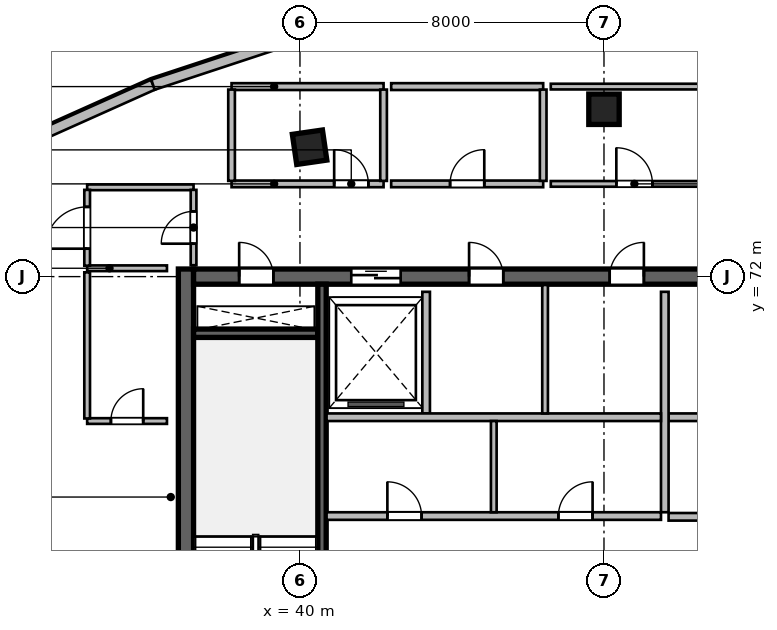
"""IFC4 building model, lengths in metres.
Left out: names, types, materials, properties, quantities, classifications, styles, units other than length and angle.
Written with IfcOpenShell. Run it as: python <this file> out.ifc"""

import sys

from ifc_helpers import new_model, si_unit, direction, frame, frame_2d, origin, origin_2d, place, context, subcontext, project, spatial, rectangle, extrude, source, transform, mapped, element, fill, save


model = new_model("IFC4")
c1 = context("Model", 3, precision=1e-05, world=origin(), true_north=direction((0.0, 1.0)))
c2 = subcontext(c1, "Body", "Model", "MODEL_VIEW")
j1 = project(units=[si_unit("LENGTHUNIT", "METRE"), si_unit("PLANEANGLEUNIT", "RADIAN")], contexts=[c1])
p1 = place(None, origin())
s1 = spatial("IfcSite", under=j1, at=p1, CompositionType="ELEMENT")
p2 = place(p1, origin())
s2 = spatial("IfcBuilding", under=s1, at=p2, CompositionType="ELEMENT")
p3 = place(p2, frame((0.0, 0.0, 267.9)))
s3 = spatial("IfcBuildingStorey", under=s2, at=p3, CompositionType="ELEMENT", Elevation=267.9)
m1 = source(origin(), c2, "Body", "SweptSolid", [
    extrude(rectangle(XDim=12.0, YDim=0.4, at=frame_2d((6.0, 0.0))), origin(), (0.0, 0.0, 1.0), 3.9),
])
p4 = place(p3, frame((37.0, 60.2, 0.0), z_axis=(0.0, 0.0, 1.0), x_axis=(0.0, 1.0, 0.0)))
e1 = element("IfcWall", 1, at=p4, inside=s3, PredefinedType="SHEAR", context=c2, shape_type="MappedRepresentation", body=[
    mapped(m1, transform((0.0, 0.0, 0.0), scale=1.0)),
])
m2 = source(origin(), c2, "Body", "SweptSolid", [
    extrude(rectangle(XDim=21.6, YDim=0.4, at=frame_2d((10.8, 0.0))), origin(), (0.0, 0.0, 1.0), 3.9),
])
p5 = place(p3, frame((37.2, 72.0, 0.0), z_axis=(0.0, 0.0, 1.0), x_axis=(1.0, 0.0, 0.0)))
e2 = element("IfcWall", 2, at=p5, inside=s3, PredefinedType="SHEAR", context=c2, shape_type="MappedRepresentation", body=[
    mapped(m2, transform((0.0, 0.0, 0.0), scale=1.0)),
])
p6 = place(p5, frame((1.2, 0.0, 0.0)))
e3 = element("IfcOpeningElement", 3, at=p6, cuts=e2, PredefinedType="OPENING", context=c2, shape_type="SweptSolid", body=[
    extrude(rectangle(XDim=0.9, YDim=2.1, at=frame_2d((0.45, 1.05))), frame((0.0, 0.21, 0.0), z_axis=(0.0, -1.0, 0.0), x_axis=(1.0, 0.0, 0.0)), (0.0, 0.0, 1.0), 0.42),
])
p7 = place(p5, frame((14.7, 0.0, 0.0)))
e4 = element("IfcOpeningElement", 4, at=p7, cuts=e2, PredefinedType="OPENING", context=c2, shape_type="SweptSolid", body=[
    extrude(rectangle(XDim=1.2, YDim=2.15, at=frame_2d((0.6, 1.075))), frame((0.0, 0.21, 0.0), z_axis=(0.0, -1.0, 0.0), x_axis=(1.0, 0.0, 0.0)), (0.0, 0.0, 1.0), 0.42),
])
p8 = place(p5, frame((4.15, 0.0, 0.0)))
e5 = element("IfcOpeningElement", 5, at=p8, cuts=e2, PredefinedType="OPENING", context=c2, shape_type="SweptSolid", body=[
    extrude(rectangle(XDim=1.3, YDim=2.15, at=frame_2d((0.65, 1.075))), frame((0.0, 0.21, 0.0), z_axis=(0.0, -1.0, 0.0), x_axis=(1.0, 0.0, 0.0)), (0.0, 0.0, 1.0), 0.42),
])
p9 = place(p5, frame((7.25, 0.0, 0.0)))
e6 = element("IfcOpeningElement", 6, at=p9, cuts=e2, PredefinedType="OPENING", context=c2, shape_type="SweptSolid", body=[
    extrude(rectangle(XDim=0.9, YDim=2.1, at=frame_2d((0.45, 1.05))), frame((0.0, 0.21, 0.0), z_axis=(0.0, -1.0, 0.0), x_axis=(1.0, 0.0, 0.0)), (0.0, 0.0, 1.0), 0.42),
])
p10 = place(p5, frame((10.95, 0.0, 0.0)))
e7 = element("IfcOpeningElement", 7, at=p10, cuts=e2, PredefinedType="OPENING", context=c2, shape_type="SweptSolid", body=[
    extrude(rectangle(XDim=0.9, YDim=2.1, at=frame_2d((0.45, 1.05))), frame((0.0, 0.21, 0.0), z_axis=(0.0, -1.0, 0.0), x_axis=(1.0, 0.0, 0.0)), (0.0, 0.0, 1.0), 0.42),
])
m3 = source(origin(), c2, "Body", "SweptSolid", [
    extrude(rectangle(XDim=3.27, YDim=0.22, at=frame_2d((1.635, 0.0))), origin(), (0.0, 0.0, 1.0), 3.9),
])
p11 = place(p3, frame((37.2, 70.51, 0.0), z_axis=(0.0, 0.0, 1.0), x_axis=(1.0, 0.0, 0.0)))
e8 = element("IfcWall", 8, at=p11, inside=s3, PredefinedType="SHEAR", context=c2, shape_type="MappedRepresentation", body=[
    mapped(m3, transform((0.0, 0.0, 0.0), scale=1.0)),
])
m4 = source(origin(), c2, "Body", "SweptSolid", [
    extrude(rectangle(XDim=11.2, YDim=0.22, at=frame_2d((5.6, 0.0))), origin(), (0.0, 0.0, 1.0), 3.9),
])
p12 = place(p3, frame((40.58, 60.6, 0.0), z_axis=(0.0, 0.0, 1.0), x_axis=(0.0, 1.0, 0.0)))
e9 = element("IfcWall", 9, at=p12, inside=s3, PredefinedType="SHEAR", context=c2, shape_type="MappedRepresentation", body=[
    mapped(m4, transform((0.0, 0.0, 0.0), scale=1.0)),
])
m5 = source(origin(), c2, "Body", "SweptSolid", [
    extrude(rectangle(XDim=0.8, YDim=0.8, at=origin_2d()), origin(), (0.0, 0.0, 1.0), 3.9),
])
for number, where, z_axis, x_axis in (
    (10, (40.253, 75.404, 0.0), (0.0, 0.0, 1.0), (-0.143, 0.99, 0.0)),
    (11, (48.0, 76.404, 0.0), (0.0, 0.0, 1.0), (0.0, 1.0, 0.0)),
):
    element("IfcColumn", number, at=place(p3, frame(where, z_axis=z_axis, x_axis=x_axis)), inside=s3, PredefinedType="COLUMN", context=c2, shape_type="MappedRepresentation", body=[
        mapped(m5, transform((0.0, 0.0, 0.0), scale=1.0)),
    ])
m6 = source(origin(), c2, "Body", "SweptSolid", [
    extrude(rectangle(XDim=3.599, YDim=0.28, at=frame_2d((1.799, 0.0))), origin(), (0.0, 0.0, 1.0), 3.65),
])
p13 = place(p3, frame((32.848, 75.579, 0.0), z_axis=(0.0, 0.0, 1.0), x_axis=(0.912714407797, 0.40859810303, 0.0)))
e12 = element("IfcWall", 12, at=p13, inside=s3, PredefinedType="SOLIDWALL", context=c2, shape_type="MappedRepresentation", body=[
    mapped(m6, transform((0.0, 0.0, 0.0), scale=1.0)),
])
m7 = source(origin(), c2, "Body", "SweptSolid", [
    extrude(rectangle(XDim=3.54, YDim=0.28, at=frame_2d((1.77, 0.0))), origin(), (0.0, 0.0, 1.0), 3.65),
])
p14 = place(p3, frame((36.132, 77.049, 0.0), z_axis=(0.0, 0.0, 1.0), x_axis=(0.949678507031, 0.313226329165, 0.0)))
e13 = element("IfcWall", 13, at=p14, inside=s3, PredefinedType="SOLIDWALL", context=c2, shape_type="MappedRepresentation", body=[
    mapped(m7, transform((0.0, 0.0, 0.0), scale=1.0)),
])
m8 = source(origin(), c2, "Body", "SweptSolid", [
    extrude(rectangle(XDim=5.62, YDim=0.2, at=frame_2d((2.81, 0.0))), origin(), (0.0, 0.0, 1.0), 3.65),
])
p15 = place(p3, frame((49.7, 68.3, 0.0), z_axis=(0.0, 0.0, 1.0), x_axis=(1.0, 0.0, 0.0)))
e14 = element("IfcWall", 14, at=p15, inside=s3, PredefinedType="SOLIDWALL", context=c2, shape_type="MappedRepresentation", body=[
    mapped(m8, transform((0.0, 0.0, 0.0), scale=1.0)),
])
p16 = place(p15, frame((1.6, 0.0, 0.0)))
e15 = element("IfcOpeningElement", 15, at=p16, cuts=e14, PredefinedType="OPENING", context=c2, shape_type="SweptSolid", body=[
    extrude(rectangle(XDim=1.1, YDim=2.15, at=frame_2d((0.55, 1.075))), frame((0.0, 0.11, 0.0), z_axis=(0.0, -1.0, 0.0), x_axis=(1.0, 0.0, 0.0)), (0.0, 0.0, 1.0), 0.22),
])
p17 = place(p15, frame((3.7, 0.0, 0.0)))
e16 = element("IfcOpeningElement", 16, at=p17, cuts=e14, PredefinedType="OPENING", context=c2, shape_type="SweptSolid", body=[
    extrude(rectangle(XDim=1.1, YDim=2.15, at=frame_2d((0.55, 1.075))), frame((0.0, 0.11, 0.0), z_axis=(0.0, -1.0, 0.0), x_axis=(1.0, 0.0, 0.0)), (0.0, 0.0, 1.0), 0.22),
])
m9 = source(origin(), c2, "Body", "SweptSolid", [
    extrude(rectangle(XDim=5.8, YDim=0.2, at=frame_2d((2.9, 0.0))), origin(), (0.0, 0.0, 1.0), 3.65),
])
p18 = place(p3, frame((49.6, 65.8, 0.0), z_axis=(0.0, 0.0, 1.0), x_axis=(0.0, 1.0, 0.0)))
e17 = element("IfcWall", 17, at=p18, inside=s3, PredefinedType="SOLIDWALL", context=c2, shape_type="MappedRepresentation", body=[
    mapped(m9, transform((0.0, 0.0, 0.0), scale=1.0)),
])
p19 = place(p3, frame((49.7, 65.68, 0.0), z_axis=(0.0, 0.0, 1.0), x_axis=(1.0, 0.0, 0.0)))
e18 = element("IfcWall", 18, at=p19, inside=s3, PredefinedType="SOLIDWALL", context=c2, shape_type="MappedRepresentation", body=[
    mapped(m8, transform((0.0, 0.0, 0.0), scale=1.0)),
])
m10 = source(origin(), c2, "Body", "SweptSolid", [
    extrude(rectangle(XDim=3.2, YDim=0.2, at=frame_2d((1.6, 0.0))), origin(), (0.0, 0.0, 1.0), 3.65),
])
p20 = place(p3, frame((43.32, 68.4, 0.0), z_axis=(0.0, 0.0, 1.0), x_axis=(0.0, 1.0, 0.0)))
e19 = element("IfcWall", 19, at=p20, inside=s3, PredefinedType="SOLIDWALL", context=c2, shape_type="MappedRepresentation", body=[
    mapped(m10, transform((0.0, 0.0, 0.0), scale=1.0)),
])
m11 = source(origin(), c2, "Body", "SweptSolid", [
    extrude(rectangle(XDim=8.8, YDim=0.2, at=frame_2d((4.4, 0.0))), origin(), (0.0, 0.0, 1.0), 3.65),
])
p21 = place(p3, frame((40.7, 68.3, 0.0), z_axis=(0.0, 0.0, 1.0), x_axis=(1.0, 0.0, 0.0)))
e20 = element("IfcWall", 20, at=p21, inside=s3, PredefinedType="SOLIDWALL", context=c2, shape_type="MappedRepresentation", body=[
    mapped(m11, transform((0.0, 0.0, 0.0), scale=1.0)),
])
m12 = source(origin(), c2, "Body", "SweptSolid", [
    extrude(rectangle(XDim=3.38, YDim=0.15, at=frame_2d((1.69, 0.0))), origin(), (0.0, 0.0, 1.0), 3.65),
])
p22 = place(p3, frame((46.45, 68.4, 0.0), z_axis=(0.0, 0.0, 1.0), x_axis=(0.0, 1.0, 0.0)))
e21 = element("IfcWall", 21, at=p22, inside=s3, PredefinedType="PARTITIONING", context=c2, shape_type="MappedRepresentation", body=[
    mapped(m12, transform((0.0, 0.0, 0.0), scale=1.0)),
])
p23 = place(p3, frame((40.7, 65.7, 0.0), z_axis=(0.0, 0.0, 1.0), x_axis=(1.0, 0.0, 0.0)))
e22 = element("IfcWall", 22, at=p23, inside=s3, PredefinedType="SOLIDWALL", context=c2, shape_type="MappedRepresentation", body=[
    mapped(m11, transform((0.0, 0.0, 0.0), scale=1.0)),
])
p24 = place(p23, frame((1.6, 0.0, 0.0)))
e23 = element("IfcOpeningElement", 23, at=p24, cuts=e22, PredefinedType="OPENING", context=c2, shape_type="SweptSolid", body=[
    extrude(rectangle(XDim=0.9, YDim=2.1, at=frame_2d((0.45, 1.05))), frame((0.0, 0.11, 0.0), z_axis=(0.0, -1.0, 0.0), x_axis=(1.0, 0.0, 0.0)), (0.0, 0.0, 1.0), 0.22),
])
p25 = place(p23, frame((6.1, 0.0, 0.0)))
e24 = element("IfcOpeningElement", 24, at=p25, cuts=e22, PredefinedType="OPENING", context=c2, shape_type="SweptSolid", body=[
    extrude(rectangle(XDim=0.9, YDim=2.1, at=frame_2d((0.45, 1.05))), frame((0.0, 0.11, 0.0), z_axis=(0.0, -1.0, 0.0), x_axis=(1.0, 0.0, 0.0)), (0.0, 0.0, 1.0), 0.22),
])
m13 = source(origin(), c2, "Body", "SweptSolid", [
    extrude(rectangle(XDim=2.4, YDim=0.15, at=frame_2d((1.2, 0.0))), origin(), (0.0, 0.0, 1.0), 3.65),
])
p26 = place(p3, frame((45.1, 65.8, 0.0), z_axis=(0.0, 0.0, 1.0), x_axis=(0.0, 1.0, 0.0)))
e25 = element("IfcWall", 25, at=p26, inside=s3, PredefinedType="PARTITIONING", context=c2, shape_type="MappedRepresentation", body=[
    mapped(m13, transform((0.0, 0.0, 0.0), scale=1.0)),
])
m14 = source(origin(), c2, "Body", "SweptSolid", [
    extrude(rectangle(XDim=2.1, YDim=0.15, at=frame_2d((1.05, 0.0))), origin(), (0.0, 0.0, 1.0), 3.65),
])
p27 = place(p3, frame((34.4, 72.22, 0.0), z_axis=(0.0, 0.0, 1.0), x_axis=(1.0, 0.0, 0.0)))
e26 = element("IfcWall", 26, at=p27, inside=s3, PredefinedType="PARTITIONING", context=c2, shape_type="MappedRepresentation", body=[
    mapped(m14, transform((0.0, 0.0, 0.0), scale=1.0)),
])
m15 = source(origin(), c2, "Body", "SweptSolid", [
    extrude(rectangle(XDim=2.8, YDim=0.15, at=frame_2d((1.4, 0.0))), origin(), (0.0, 0.0, 1.0), 3.65),
])
p28 = place(p3, frame((34.4, 74.35, 0.0), z_axis=(0.0, 0.0, 1.0), x_axis=(1.0, 0.0, 0.0)))
e27 = element("IfcWall", 27, at=p28, inside=s3, PredefinedType="PARTITIONING", context=c2, shape_type="MappedRepresentation", body=[
    mapped(m15, transform((0.0, 0.0, 0.0), scale=1.0)),
])
m16 = source(origin(), c2, "Body", "SweptSolid", [
    extrude(rectangle(XDim=1.995, YDim=0.15, at=frame_2d((0.998, 0.0))), origin(), (0.0, 0.0, 1.0), 3.65),
])
p29 = place(p3, frame((34.4, 72.288, 0.0), z_axis=(0.0, 0.0, 1.0), x_axis=(0.0, 1.0, 0.0)))
e28 = element("IfcWall", 28, at=p29, inside=s3, PredefinedType="PARTITIONING", context=c2, shape_type="MappedRepresentation", body=[
    mapped(m16, transform((0.0, 0.0, 0.0), scale=1.0)),
])
p30 = place(p29, frame((0.448, 0.0, 0.0)))
e29 = element("IfcOpeningElement", 29, at=p30, cuts=e28, PredefinedType="OPENING", context=c2, shape_type="SweptSolid", body=[
    extrude(rectangle(XDim=1.1, YDim=2.15, at=frame_2d((0.55, 1.075))), frame((0.0, 0.085, 0.0), z_axis=(0.0, -1.0, 0.0), x_axis=(1.0, 0.0, 0.0)), (0.0, 0.0, 1.0), 0.17),
])
m17 = source(origin(), c2, "Body", "SweptSolid", [
    extrude(rectangle(XDim=1.982, YDim=0.15, at=frame_2d((0.991, 0.0))), origin(), (0.0, 0.0, 1.0), 3.65),
])
p31 = place(p3, frame((37.2, 72.3, 0.0), z_axis=(0.0, 0.0, 1.0), x_axis=(0.0, 1.0, 0.0)))
e30 = element("IfcWall", 30, at=p31, inside=s3, PredefinedType="PARTITIONING", context=c2, shape_type="MappedRepresentation", body=[
    mapped(m17, transform((0.0, 0.0, 0.0), scale=1.0)),
])
p32 = place(p31, frame((0.566, 0.0, 0.0)))
e31 = element("IfcOpeningElement", 31, at=p32, cuts=e30, PredefinedType="OPENING", context=c2, shape_type="SweptSolid", body=[
    extrude(rectangle(XDim=0.85, YDim=2.1, at=frame_2d((0.425, 1.05))), frame((0.0, 0.085, 0.0), z_axis=(0.0, -1.0, 0.0), x_axis=(1.0, 0.0, 0.0)), (0.0, 0.0, 1.0), 0.17),
])
p33 = place(p3, frame((34.4, 68.2, 0.0), z_axis=(0.0, 0.0, 1.0), x_axis=(1.0, 0.0, 0.0)))
e32 = element("IfcWall", 32, at=p33, inside=s3, PredefinedType="PARTITIONING", context=c2, shape_type="MappedRepresentation", body=[
    mapped(m14, transform((0.0, 0.0, 0.0), scale=1.0)),
])
p34 = place(p33, frame((0.625, 0.0, 0.0)))
e33 = element("IfcOpeningElement", 33, at=p34, cuts=e32, PredefinedType="OPENING", context=c2, shape_type="SweptSolid", body=[
    extrude(rectangle(XDim=0.85, YDim=2.1, at=frame_2d((0.425, 1.05))), frame((0.0, 0.085, 0.0), z_axis=(0.0, -1.0, 0.0), x_axis=(1.0, 0.0, 0.0)), (0.0, 0.0, 1.0), 0.17),
])
m18 = source(origin(), c2, "Body", "SweptSolid", [
    extrude(rectangle(XDim=3.845, YDim=0.15, at=frame_2d((1.922, 0.0))), origin(), (0.0, 0.0, 1.0), 3.65),
])
p35 = place(p3, frame((34.4, 68.268, 0.0), z_axis=(0.0, 0.0, 1.0), x_axis=(0.0, 1.0, 0.0)))
e34 = element("IfcWall", 34, at=p35, inside=s3, PredefinedType="PARTITIONING", context=c2, shape_type="MappedRepresentation", body=[
    mapped(m18, transform((0.0, 0.0, 0.0), scale=1.0)),
])
m19 = source(origin(), c2, "Body", "SweptSolid", [
    extrude(rectangle(XDim=4.0, YDim=0.175, at=frame_2d((2.0, 0.0))), origin(), (0.0, 0.0, 1.0), 3.65),
])
p36 = place(p3, frame((38.2, 74.44, 0.0), z_axis=(0.0, 0.0, 1.0), x_axis=(1.0, 0.0, 0.0)))
e35 = element("IfcWall", 35, at=p36, inside=s3, PredefinedType="PARTITIONING", context=c2, shape_type="MappedRepresentation", body=[
    mapped(m19, transform((0.0, 0.0, 0.0), scale=1.0)),
])
p37 = place(p36, frame((2.7, 0.0, 0.0)))
e36 = element("IfcOpeningElement", 36, at=p37, cuts=e35, PredefinedType="OPENING", context=c2, shape_type="SweptSolid", body=[
    extrude(rectangle(XDim=0.9, YDim=2.08, at=frame_2d((0.45, 1.04))), frame((0.0, 0.098, 0.0), z_axis=(0.0, -1.0, 0.0), x_axis=(1.0, 0.0, 0.0)), (0.0, 0.0, 1.0), 0.195),
])
m20 = source(origin(), c2, "Body", "SweptSolid", [
    extrude(rectangle(XDim=4.0, YDim=0.18, at=frame_2d((2.0, 0.0))), origin(), (0.0, 0.0, 1.0), 3.65),
])
p38 = place(p3, frame((38.2, 77.0, 0.0), z_axis=(0.0, 0.0, 1.0), x_axis=(1.0, 0.0, 0.0)))
e37 = element("IfcWall", 37, at=p38, inside=s3, PredefinedType="PLUMBINGWALL", context=c2, shape_type="MappedRepresentation", body=[
    mapped(m20, transform((0.0, 0.0, 0.0), scale=1.0)),
])
m21 = source(origin(), c2, "Body", "SweptSolid", [
    extrude(rectangle(XDim=2.403, YDim=0.175, at=frame_2d((1.201, 0.0))), origin(), (0.0, 0.0, 1.0), 3.65),
])
for number, where, z_axis, x_axis in (
    (38, (38.2, 74.519, 0.0), (0.0, 0.0, 1.0), (0.0, 1.0, 0.0)),
    (39, (42.2, 74.519, 0.0), (0.0, 0.0, 1.0), (0.0, 1.0, 0.0)),
):
    element("IfcWall", number, at=place(p3, frame(where, z_axis=z_axis, x_axis=x_axis)), inside=s3, PredefinedType="PARTITIONING", context=c2, shape_type="MappedRepresentation", body=[
        mapped(m21, transform((0.0, 0.0, 0.0), scale=1.0)),
    ])
p39 = place(p3, frame((42.4, 74.44, 0.0), z_axis=(0.0, 0.0, 1.0), x_axis=(1.0, 0.0, 0.0)))
e40 = element("IfcWall", 40, at=p39, inside=s3, PredefinedType="PARTITIONING", context=c2, shape_type="MappedRepresentation", body=[
    mapped(m19, transform((0.0, 0.0, 0.0), scale=1.0)),
])
p40 = place(p39, frame((1.55, 0.0, 0.0)))
e41 = element("IfcOpeningElement", 41, at=p40, cuts=e40, PredefinedType="OPENING", context=c2, shape_type="SweptSolid", body=[
    extrude(rectangle(XDim=0.9, YDim=2.08, at=frame_2d((0.45, 1.04))), frame((0.0, 0.098, 0.0), z_axis=(0.0, -1.0, 0.0), x_axis=(1.0, 0.0, 0.0)), (0.0, 0.0, 1.0), 0.195),
])
p41 = place(p3, frame((42.4, 77.0, 0.0), z_axis=(0.0, 0.0, 1.0), x_axis=(1.0, 0.0, 0.0)))
e42 = element("IfcWall", 42, at=p41, inside=s3, PredefinedType="PLUMBINGWALL", context=c2, shape_type="MappedRepresentation", body=[
    mapped(m20, transform((0.0, 0.0, 0.0), scale=1.0)),
])
p42 = place(p3, frame((46.4, 74.519, 0.0), z_axis=(0.0, 0.0, 1.0), x_axis=(0.0, 1.0, 0.0)))
e43 = element("IfcWall", 43, at=p42, inside=s3, PredefinedType="PARTITIONING", context=c2, shape_type="MappedRepresentation", body=[
    mapped(m21, transform((0.0, 0.0, 0.0), scale=1.0)),
])
m22 = source(origin(), c2, "Body", "SweptSolid", [
    extrude(rectangle(XDim=4.4, YDim=0.15, at=frame_2d((2.2, 0.0))), origin(), (0.0, 0.0, 1.0), 3.65),
])
p43 = place(p3, frame((46.6, 74.44, 0.0), z_axis=(0.0, 0.0, 1.0), x_axis=(1.0, 0.0, 0.0)))
e44 = element("IfcWall", 44, at=p43, inside=s3, PredefinedType="PARTITIONING", context=c2, shape_type="MappedRepresentation", body=[
    mapped(m22, transform((0.0, 0.0, 0.0), scale=1.0)),
])
p44 = place(p43, frame((1.725, 0.0, 0.0)))
e45 = element("IfcOpeningElement", 45, at=p44, cuts=e44, PredefinedType="OPENING", context=c2, shape_type="SweptSolid", body=[
    extrude(rectangle(XDim=0.95, YDim=2.1, at=frame_2d((0.475, 1.05))), frame((0.0, 0.085, 0.0), z_axis=(0.0, -1.0, 0.0), x_axis=(1.0, 0.0, 0.0)), (0.0, 0.0, 1.0), 0.17),
])
p45 = place(p3, frame((46.6, 77.0, 0.0), z_axis=(0.0, 0.0, 1.0), x_axis=(1.0, 0.0, 0.0)))
e46 = element("IfcWall", 46, at=p45, inside=s3, PredefinedType="PARTITIONING", context=c2, shape_type="MappedRepresentation", body=[
    mapped(m22, transform((0.0, 0.0, 0.0), scale=1.0)),
])
m23 = source(origin(), c2, "Body", "SweptSolid", [
    extrude(rectangle(XDim=0.9, YDim=2.1, at=frame_2d((0.45, 1.05))), frame((0.0, 0.025, 0.0), z_axis=(0.0, -1.0, 0.0), x_axis=(1.0, 0.0, 0.0)), (0.0, 0.0, 1.0), 0.05),
])
p46 = place(p6, origin())
e47 = element("IfcDoor", 47, at=p46, inside=s3, OperationType="SINGLE_SWING_LEFT", PredefinedType="DOOR", context=c2, shape_type="MappedRepresentation", body=[
    mapped(m23, transform((0.0, 0.0, 0.0), scale=1.0)),
])
fill(e3, e47)
m24 = source(origin(), c2, "Body", "SweptSolid", [
    extrude(rectangle(XDim=1.3, YDim=2.15, at=frame_2d((0.65, 1.075))), frame((0.0, 0.025, 0.0), z_axis=(0.0, -1.0, 0.0), x_axis=(1.0, 0.0, 0.0)), (0.0, 0.0, 1.0), 0.05),
])
p47 = place(p8, origin())
e48 = element("IfcDoor", 48, at=p47, inside=s3, OperationType="DOUBLE_DOOR_SLIDING", PredefinedType="DOOR", context=c2, shape_type="MappedRepresentation", body=[
    mapped(m24, transform((0.0, 0.0, 0.0), scale=1.0)),
])
fill(e5, e48)
p48 = place(p9, origin())
e49 = element("IfcDoor", 49, at=p48, inside=s3, OperationType="SINGLE_SWING_LEFT", PredefinedType="DOOR", context=c2, shape_type="MappedRepresentation", body=[
    mapped(m23, transform((0.0, 0.0, 0.0), scale=1.0)),
])
fill(e6, e49)
p49 = place(p10, origin())
e50 = element("IfcDoor", 50, at=p49, inside=s3, OperationType="SINGLE_SWING_RIGHT", PredefinedType="DOOR", context=c2, shape_type="MappedRepresentation", body=[
    mapped(m23, transform((0.0, 0.0, 0.0), scale=1.0)),
])
fill(e7, e50)
p50 = place(p24, origin())
e51 = element("IfcDoor", 51, at=p50, inside=s3, OperationType="SINGLE_SWING_LEFT", PredefinedType="DOOR", context=c2, shape_type="MappedRepresentation", body=[
    mapped(m23, transform((0.0, 0.0, 0.0), scale=1.0)),
])
fill(e23, e51)
p51 = place(p25, origin())
e52 = element("IfcDoor", 52, at=p51, inside=s3, OperationType="SINGLE_SWING_RIGHT", PredefinedType="DOOR", context=c2, shape_type="MappedRepresentation", body=[
    mapped(m23, transform((0.0, 0.0, 0.0), scale=1.0)),
])
fill(e24, e52)
m25 = source(origin(), c2, "Body", "SweptSolid", [
    extrude(rectangle(XDim=0.85, YDim=2.1, at=frame_2d((0.425, 1.05))), frame((0.0, 0.025, 0.0), z_axis=(0.0, -1.0, 0.0), x_axis=(1.0, 0.0, 0.0)), (0.0, 0.0, 1.0), 0.05),
])
p52 = place(p32, origin())
e53 = element("IfcDoor", 53, at=p52, inside=s3, OperationType="SINGLE_SWING_LEFT", PredefinedType="DOOR", context=c2, shape_type="MappedRepresentation", body=[
    mapped(m25, transform((0.0, 0.0, 0.0), scale=1.0)),
])
fill(e31, e53)
p53 = place(p34, origin())
e54 = element("IfcDoor", 54, at=p53, inside=s3, OperationType="SINGLE_SWING_RIGHT", PredefinedType="DOOR", context=c2, shape_type="MappedRepresentation", body=[
    mapped(m25, transform((0.0, 0.0, 0.0), scale=1.0)),
])
fill(e33, e54)
m26 = source(origin(), c2, "Body", "SweptSolid", [
    extrude(rectangle(XDim=0.9, YDim=2.08, at=frame_2d((0.45, 1.04))), frame((0.0, 0.025, 0.0), z_axis=(0.0, -1.0, 0.0), x_axis=(1.0, 0.0, 0.0)), (0.0, 0.0, 1.0), 0.05),
])
p54 = place(p37, origin())
e55 = element("IfcDoor", 55, at=p54, inside=s3, OperationType="SINGLE_SWING_LEFT", PredefinedType="DOOR", context=c2, shape_type="MappedRepresentation", body=[
    mapped(m26, transform((0.0, 0.0, 0.0), scale=1.0)),
])
fill(e36, e55)
p55 = place(p40, origin())
e56 = element("IfcDoor", 56, at=p55, inside=s3, OperationType="SINGLE_SWING_RIGHT", PredefinedType="DOOR", context=c2, shape_type="MappedRepresentation", body=[
    mapped(m26, transform((0.0, 0.0, 0.0), scale=1.0)),
])
fill(e41, e56)
m27 = source(origin(), c2, "Body", "SweptSolid", [
    extrude(rectangle(XDim=0.95, YDim=2.1, at=frame_2d((0.475, 1.05))), frame((0.0, 0.025, 0.0), z_axis=(0.0, -1.0, 0.0), x_axis=(1.0, 0.0, 0.0)), (0.0, 0.0, 1.0), 0.05),
])
p56 = place(p44, origin())
e57 = element("IfcDoor", 57, at=p56, inside=s3, OperationType="SINGLE_SWING_LEFT", PredefinedType="DOOR", context=c2, shape_type="MappedRepresentation", body=[
    mapped(m27, transform((0.0, 0.0, 0.0), scale=1.0)),
])
fill(e45, e57)
m28 = source(origin(), c2, "Body", "SweptSolid", [
    extrude(rectangle(XDim=1.1, YDim=2.15, at=frame_2d((0.55, 1.075))), frame((0.0, 0.025, 0.0), z_axis=(0.0, -1.0, 0.0), x_axis=(1.0, 0.0, 0.0)), (0.0, 0.0, 1.0), 0.05),
])
p57 = place(p30, origin())
e58 = element("IfcDoor", 58, at=p57, inside=s3, OperationType="SINGLE_SWING_LEFT", PredefinedType="DOOR", context=c2, shape_type="MappedRepresentation", body=[
    mapped(m28, transform((0.0, 0.0, 0.0), scale=1.0)),
])
fill(e29, e58)
save(model, sys.argv[1])
